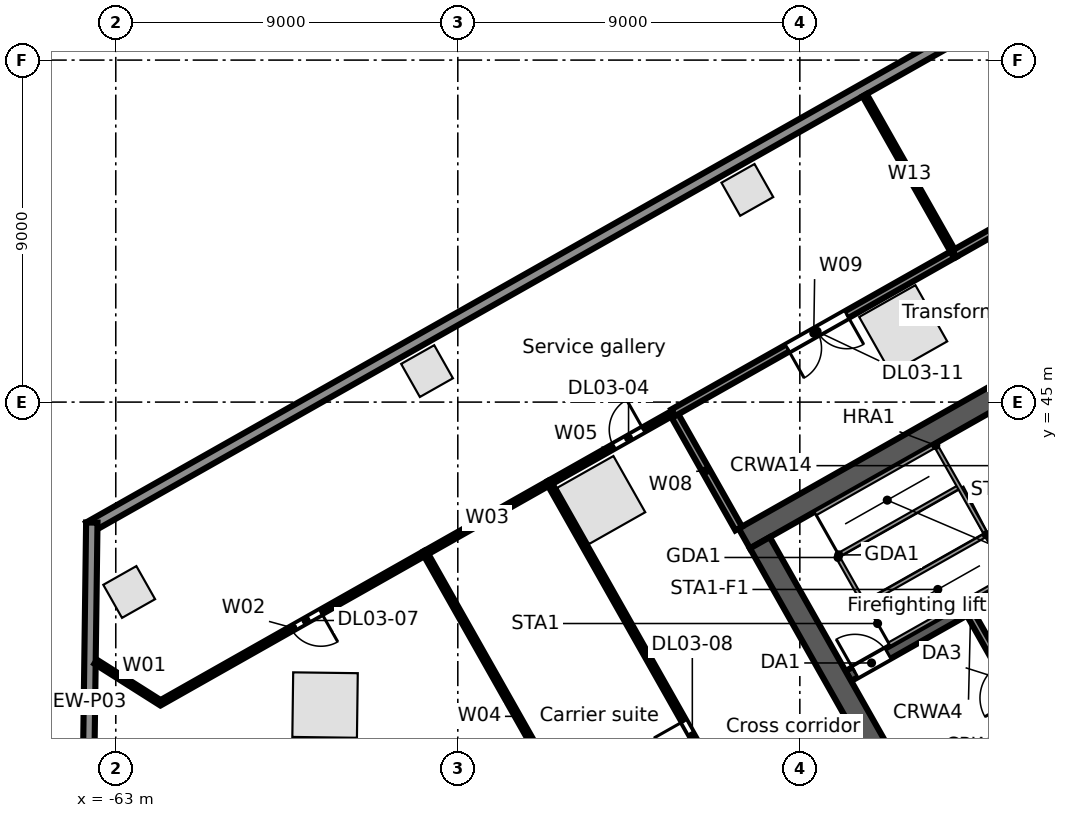
"""IFC4 building model, lengths in metres.
Left out: names, types, materials, properties, quantities, classifications, styles, units other than length and angle.
Written with IfcOpenShell. Run it as: python <this file> out.ifc"""

import sys

from ifc_helpers import new_model, si_unit, direction, frame, frame_2d, origin, origin_2d, place, context, subcontext, project, spatial, rectangle, extrude, element, fill, save


model = new_model("IFC4")
c1 = context("Model", 3, precision=1e-05, world=origin(), true_north=direction((0.0, 1.0)))
c2 = subcontext(c1, "Body", "Model", "MODEL_VIEW")
j1 = project(units=[si_unit("LENGTHUNIT", "METRE"), si_unit("PLANEANGLEUNIT", "RADIAN")], contexts=[c1])
p1 = place(None, origin())
s1 = spatial("IfcSite", under=j1, at=p1, CompositionType="ELEMENT")
p2 = place(p1, origin())
s2 = spatial("IfcBuilding", under=s1, at=p2, CompositionType="ELEMENT")
p3 = place(p2, frame((0.0, 0.0, 21.5)))
s3 = spatial("IfcBuildingStorey", under=s2, at=p3, CompositionType="ELEMENT", Elevation=21.5)
for number, where, z_axis, x_axis in (
    (1, (-42.28, 46.919, 0.0), (0.0, 0.0, 1.0), (-0.87, -0.492, 0.0)),
    (2, (-50.226, 42.423, 0.0), (0.0, 0.0, 1.0), (-0.87, -0.492, 0.0)),
    (3, (-57.493, 37.027, 0.0), (0.0, 0.0, 1.0), (-0.013, -1.0, 0.0)),
):
    element("IfcColumn", number, at=place(p3, frame(where, z_axis=z_axis, x_axis=x_axis)), inside=s3, PredefinedType="COLUMN", context=c2, shape_type="SweptSolid", body=[
        extrude(rectangle(XDim=1.7, YDim=1.7, at=origin_2d()), origin(), (0.0, 0.0, 1.0), 5.0),
    ])
for number, where, z_axis, x_axis in (
    (4, (-46.381, 50.584, 0.0), (0.0, 0.0, 1.0), (-0.87, -0.492, 0.0)),
    (5, (-54.81, 45.816, 0.0), (0.0, 0.0, 1.0), (-0.87, -0.492, 0.0)),
    (6, (-62.647, 40.003, 0.0), (0.0, 0.0, 1.0), (-0.87, -0.492, 0.0)),
):
    element("IfcColumn", number, at=place(p3, frame(where, z_axis=z_axis, x_axis=x_axis)), inside=s3, PredefinedType="COLUMN", context=c2, shape_type="SweptSolid", body=[
        extrude(rectangle(XDim=1.0, YDim=1.0, at=origin_2d()), origin(), (0.0, 0.0, 1.0), 4.68),
    ])
p4 = place(p3, frame((-63.707, 41.701, 0.0), z_axis=(0.0, 0.0, 1.0), x_axis=(0.870355510268, 0.492423888277, 0.0)))
e7 = element("IfcWall", 7, at=p4, inside=s3, PredefinedType="STANDARD", context=c2, shape_type="SweptSolid", body=[
    extrude(rectangle(XDim=67.903, YDim=0.3, at=frame_2d((33.952, 0.0))), origin(), (0.0, 0.0, 1.0), 4.68),
])
p5 = place(p3, frame((-63.754, 32.387, 0.0), z_axis=(0.0, 0.0, 1.0), x_axis=(0.013081929375, 0.999914427901, 0.0)))
e8 = element("IfcWall", 8, at=p5, inside=s3, PredefinedType="STANDARD", context=c2, shape_type="SweptSolid", body=[
    extrude(rectangle(XDim=9.443, YDim=0.3, at=frame_2d((4.722, 0.0))), origin(), (0.0, 0.0, 1.0), 4.68),
])
p6 = place(p3, frame((-41.556, 33.961, 0.0), z_axis=(0.0, 0.0, 1.0), x_axis=(0.870343731308, 0.492444706919, 0.0)))
e9 = element("IfcWall", 9, at=p6, inside=s3, PredefinedType="SOLIDWALL", context=c2, shape_type="SweptSolid", body=[
    extrude(rectangle(XDim=6.0, YDim=0.3, at=frame_2d((3.0, 0.0))), origin(), (0.0, 0.0, 1.0), 4.68),
])
p7 = place(p6, frame((1.1, 0.0, 0.0)))
e10 = element("IfcOpeningElement", 10, at=p7, cuts=e9, PredefinedType="OPENING", context=c2, shape_type="SweptSolid", body=[
    extrude(rectangle(XDim=1.1, YDim=2.1, at=frame_2d((0.55, 1.05))), frame((0.0, 0.16, 0.0), z_axis=(0.0, -1.0, 0.0), x_axis=(1.0, 0.0, 0.0)), (0.0, 0.0, 1.0), 0.32),
])
p8 = place(p6, frame((4.25, 0.0, 0.0)))
e11 = element("IfcOpeningElement", 11, at=p8, cuts=e9, PredefinedType="OPENING", context=c2, shape_type="SweptSolid", body=[
    extrude(rectangle(XDim=1.1, YDim=2.1, at=frame_2d((0.55, 1.05))), frame((0.0, 0.16, 0.0), z_axis=(0.0, -1.0, 0.0), x_axis=(1.0, 0.0, 0.0)), (0.0, 0.0, 1.0), 0.32),
])
p9 = place(p3, frame((-43.723, 37.791, 0.0), z_axis=(0.0, 0.0, 1.0), x_axis=(0.87035077051, 0.49243226567, 0.0)))
e12 = element("IfcWall", 12, at=p9, inside=s3, PredefinedType="SOLIDWALL", context=c2, shape_type="SweptSolid", body=[
    extrude(rectangle(XDim=7.4, YDim=0.3, at=frame_2d((3.7, 0.0))), origin(), (0.0, 0.0, 1.0), 4.68),
])
p10 = place(p9, frame((0.2, 0.0, 0.0)))
e13 = element("IfcOpeningElement", 13, at=p10, cuts=e12, PredefinedType="OPENING", context=c2, shape_type="SweptSolid", body=[
    extrude(rectangle(XDim=1.0, YDim=2.1, at=frame_2d((0.5, 1.05))), frame((0.0, 0.16, 0.0), z_axis=(0.0, -1.0, 0.0), x_axis=(1.0, 0.0, 0.0)), (0.0, 0.0, 1.0), 0.32),
])
p11 = place(p3, frame((-46.461, 41.412, 0.0), z_axis=(0.0, 0.0, 1.0), x_axis=(0.870350116061, 0.492433422375, 0.0)))
e14 = element("IfcWall", 14, at=p11, inside=s3, PredefinedType="SOLIDWALL", context=c2, shape_type="SweptSolid", body=[
    extrude(rectangle(XDim=17.0, YDim=0.6, at=frame_2d((8.5, 0.0))), origin(), (0.0, 0.0, 1.0), 4.68),
])
p12 = place(p3, frame((-46.052, 41.298, 0.0), z_axis=(0.0, 0.0, 1.0), x_axis=(0.492418598281, -0.870358503186, 0.0)))
e15 = element("IfcWall", 15, at=p12, inside=s3, PredefinedType="SOLIDWALL", context=c2, shape_type="SweptSolid", body=[
    extrude(rectangle(XDim=12.8, YDim=0.6, at=frame_2d((6.4, 0.0))), origin(), (0.0, 0.0, 1.0), 4.68),
])
p13 = place(p3, frame((-40.516, 39.433, 0.0), z_axis=(0.0, 0.0, 1.0), x_axis=(0.492453559952, -0.87033872216, 0.0)))
e16 = element("IfcWall", 16, at=p13, inside=s3, PredefinedType="PARTITIONING", context=c2, shape_type="SweptSolid", body=[
    extrude(rectangle(XDim=4.1, YDim=0.2, at=frame_2d((2.05, 0.0))), origin(), (0.0, 0.0, 1.0), 4.68),
])
p14 = place(p13, frame((1.55, 0.0, 0.0)))
e17 = element("IfcOpeningElement", 17, at=p14, cuts=e16, PredefinedType="OPENING", context=c2, shape_type="SweptSolid", body=[
    extrude(rectangle(XDim=1.0, YDim=2.1, at=frame_2d((0.5, 1.05))), frame((0.0, 0.11, 0.0), z_axis=(0.0, -1.0, 0.0), x_axis=(1.0, 0.0, 0.0)), (0.0, 0.0, 1.0), 0.22),
])
p15 = place(p3, frame((-63.529, 38.167, 0.0), z_axis=(0.0, 0.0, 1.0), x_axis=(0.844913795328, -0.534902494352, 0.0)))
e18 = element("IfcWall", 18, at=p15, inside=s3, PredefinedType="PARTITIONING", context=c2, shape_type="SweptSolid", body=[
    extrude(rectangle(XDim=2.019, YDim=0.125, at=frame_2d((1.01, 0.0))), origin(), (0.0, 0.0, 1.0), 4.154),
])
p16 = place(p3, frame((-61.823, 37.087, 0.0), z_axis=(0.0, 0.0, 1.0), x_axis=(0.870379756599, 0.492381030609, 0.0)))
e19 = element("IfcWall", 19, at=p16, inside=s3, PredefinedType="PARTITIONING", context=c2, shape_type="SweptSolid", body=[
    extrude(rectangle(XDim=8.0, YDim=0.125, at=frame_2d((4.0, 0.0))), origin(), (0.0, 0.0, 1.0), 3.76),
])
p17 = place(p16, frame((3.95, 0.0, 0.0)))
e20 = element("IfcOpeningElement", 20, at=p17, cuts=e19, PredefinedType="OPENING", context=c2, shape_type="SweptSolid", body=[
    extrude(rectangle(XDim=0.9, YDim=2.1, at=frame_2d((0.45, 1.05))), frame((0.0, 0.073, 0.0), z_axis=(0.0, -1.0, 0.0), x_axis=(1.0, 0.0, 0.0)), (0.0, 0.0, 1.0), 0.145),
])
p18 = place(p3, frame((-54.86, 41.026, 0.0), z_axis=(0.0, 0.0, 1.0), x_axis=(0.870310553999, 0.492503339682, 0.0)))
e21 = element("IfcWall", 21, at=p18, inside=s3, PredefinedType="PARTITIONING", context=c2, shape_type="SweptSolid", body=[
    extrude(rectangle(XDim=3.75, YDim=0.125, at=frame_2d((1.875, 0.0))), origin(), (0.0, 0.0, 1.0), 4.048),
])
p19 = place(p3, frame((-54.86, 41.026, 0.0), z_axis=(0.0, 0.0, 1.0), x_axis=(0.492429637412, -0.870352257536, 0.0)))
e22 = element("IfcWall", 22, at=p19, inside=s3, PredefinedType="PARTITIONING", context=c2, shape_type="SweptSolid", body=[
    extrude(rectangle(XDim=9.872, YDim=0.125, at=frame_2d((4.936, 0.0))), origin(), (0.0, 0.0, 1.0), 3.742),
])
p20 = place(p3, frame((-51.596, 42.873, 0.0), z_axis=(0.0, 0.0, 1.0), x_axis=(0.87043427122, 0.492284652905, 0.0)))
e23 = element("IfcWall", 23, at=p20, inside=s3, PredefinedType="PARTITIONING", context=c2, shape_type="SweptSolid", body=[
    extrude(rectangle(XDim=3.75, YDim=0.125, at=frame_2d((1.875, 0.0))), origin(), (0.0, 0.0, 1.0), 4.68),
])
p21 = place(p20, frame((1.95, 0.0, 0.0)))
e24 = element("IfcOpeningElement", 24, at=p21, cuts=e23, PredefinedType="OPENING", context=c2, shape_type="SweptSolid", body=[
    extrude(rectangle(XDim=0.9, YDim=2.1, at=frame_2d((0.45, 1.05))), frame((0.0, 0.073, 0.0), z_axis=(0.0, -1.0, 0.0), x_axis=(1.0, 0.0, 0.0)), (0.0, 0.0, 1.0), 0.145),
])
p22 = place(p3, frame((-51.596, 42.873, 0.0), z_axis=(0.0, 0.0, 1.0), x_axis=(0.492435038471, -0.870349201692, 0.0)))
e25 = element("IfcWall", 25, at=p22, inside=s3, PredefinedType="PARTITIONING", context=c2, shape_type="SweptSolid", body=[
    extrude(rectangle(XDim=15.501, YDim=0.125, at=frame_2d((7.75, 0.0))), origin(), (0.0, 0.0, 1.0), 3.742),
])
p23 = place(p22, frame((7.2, 0.0, 0.0)))
e26 = element("IfcOpeningElement", 26, at=p23, cuts=e25, PredefinedType="OPENING", context=c2, shape_type="SweptSolid", body=[
    extrude(rectangle(XDim=0.9, YDim=2.1, at=frame_2d((0.45, 1.05))), frame((0.0, 0.073, 0.0), z_axis=(0.0, -1.0, 0.0), x_axis=(1.0, 0.0, 0.0)), (0.0, 0.0, 1.0), 0.145),
])
p24 = place(p3, frame((-48.332, 44.719, 0.0), z_axis=(0.0, 0.0, 1.0), x_axis=(0.492392845909, -0.87037307248, 0.0)))
e27 = element("IfcWall", 27, at=p24, inside=s3, PredefinedType="PARTITIONING", context=c2, shape_type="SweptSolid", body=[
    extrude(rectangle(XDim=3.5, YDim=0.2, at=frame_2d((1.75, 0.0))), origin(), (0.0, 0.0, 1.0), 3.96),
])
p25 = place(p3, frame((-48.332, 44.719, 0.0), z_axis=(0.0, 0.0, 1.0), x_axis=(0.870331650579, 0.492466057713, 0.0)))
e28 = element("IfcWall", 28, at=p25, inside=s3, PredefinedType="PARTITIONING", context=c2, shape_type="SweptSolid", body=[
    extrude(rectangle(XDim=8.5, YDim=0.2, at=frame_2d((4.25, 0.0))), origin(), (0.0, 0.0, 1.0), 4.054),
])
p26 = place(p25, frame((3.45, 0.0, 0.0)))
e29 = element("IfcOpeningElement", 29, at=p26, cuts=e28, PredefinedType="OPENING", context=c2, shape_type="SweptSolid", body=[
    extrude(rectangle(XDim=1.8, YDim=2.1, at=frame_2d((0.9, 1.05))), frame((0.0, 0.11, 0.0), z_axis=(0.0, -1.0, 0.0), x_axis=(1.0, 0.0, 0.0)), (0.0, 0.0, 1.0), 0.22),
])
p27 = place(p3, frame((-43.295, 53.077, 0.0), z_axis=(0.0, 0.0, 1.0), x_axis=(0.492503605136, -0.87031040378, 0.0)))
e30 = element("IfcWall", 30, at=p27, inside=s3, PredefinedType="PARTITIONING", context=c2, shape_type="SweptSolid", body=[
    extrude(rectangle(XDim=4.793, YDim=0.125, at=frame_2d((2.397, 0.0))), origin(), (0.0, 0.0, 1.0), 3.96),
])
p28 = place(p3, frame((-40.934, 48.905, 0.0), z_axis=(0.0, 0.0, 1.0), x_axis=(0.870387854278, 0.492366716102, 0.0)))
e31 = element("IfcWall", 31, at=p28, inside=s3, PredefinedType="PARTITIONING", context=c2, shape_type="SweptSolid", body=[
    extrude(rectangle(XDim=8.5, YDim=0.2, at=frame_2d((4.25, 0.0))), origin(), (0.0, 0.0, 1.0), 4.054),
])
p29 = place(p10, origin())
e32 = element("IfcDoor", 32, at=p29, inside=s3, OperationType="SINGLE_SWING_LEFT", PredefinedType="DOOR", context=c2, shape_type="SweptSolid", body=[
    extrude(rectangle(XDim=1.0, YDim=2.1, at=frame_2d((0.5, 1.05))), frame((0.0, 0.025, 0.0), z_axis=(0.0, -1.0, 0.0), x_axis=(1.0, 0.0, 0.0)), (0.0, 0.0, 1.0), 0.05),
])
fill(e13, e32)
p30 = place(p21, origin())
e33 = element("IfcDoor", 33, at=p30, inside=s3, OperationType="SINGLE_SWING_RIGHT", PredefinedType="DOOR", context=c2, shape_type="SweptSolid", body=[
    extrude(rectangle(XDim=0.9, YDim=2.1, at=frame_2d((0.45, 1.05))), frame((0.0, 0.025, 0.0), z_axis=(0.0, -1.0, 0.0), x_axis=(1.0, 0.0, 0.0)), (0.0, 0.0, 1.0), 0.05),
])
fill(e24, e33)
p31 = place(p17, frame((0.9, 0.0, 0.0), z_axis=(0.0, 0.0, 1.0), x_axis=(-1.0, 0.0, 0.0)))
e34 = element("IfcDoor", 34, at=p31, inside=s3, OperationType="SINGLE_SWING_LEFT", PredefinedType="DOOR", context=c2, shape_type="SweptSolid", body=[
    extrude(rectangle(XDim=0.9, YDim=2.1, at=frame_2d((0.45, 1.05))), frame((0.0, 0.025, 0.0), z_axis=(0.0, -1.0, 0.0), x_axis=(1.0, 0.0, 0.0)), (0.0, 0.0, 1.0), 0.05),
])
fill(e20, e34)
p32 = place(p23, frame((0.9, 0.0, 0.0), z_axis=(0.0, 0.0, 1.0), x_axis=(-1.0, 0.0, 0.0)))
e35 = element("IfcDoor", 35, at=p32, inside=s3, OperationType="SINGLE_SWING_RIGHT", PredefinedType="DOOR", context=c2, shape_type="SweptSolid", body=[
    extrude(rectangle(XDim=0.9, YDim=2.1, at=frame_2d((0.45, 1.05))), frame((0.0, 0.025, 0.0), z_axis=(0.0, -1.0, 0.0), x_axis=(1.0, 0.0, 0.0)), (0.0, 0.0, 1.0), 0.05),
])
fill(e26, e35)
p33 = place(p26, frame((1.8, 0.0, 0.0), z_axis=(0.0, 0.0, 1.0), x_axis=(-1.0, 0.0, 0.0)))
e36 = element("IfcDoor", 36, at=p33, inside=s3, OperationType="DOUBLE_DOOR_SINGLE_SWING", PredefinedType="DOOR", context=c2, shape_type="SweptSolid", body=[
    extrude(rectangle(XDim=1.8, YDim=2.1, at=frame_2d((0.9, 1.05))), frame((0.0, 0.025, 0.0), z_axis=(0.0, -1.0, 0.0), x_axis=(1.0, 0.0, 0.0)), (0.0, 0.0, 1.0), 0.05),
])
fill(e29, e36)
save(model, sys.argv[1])
